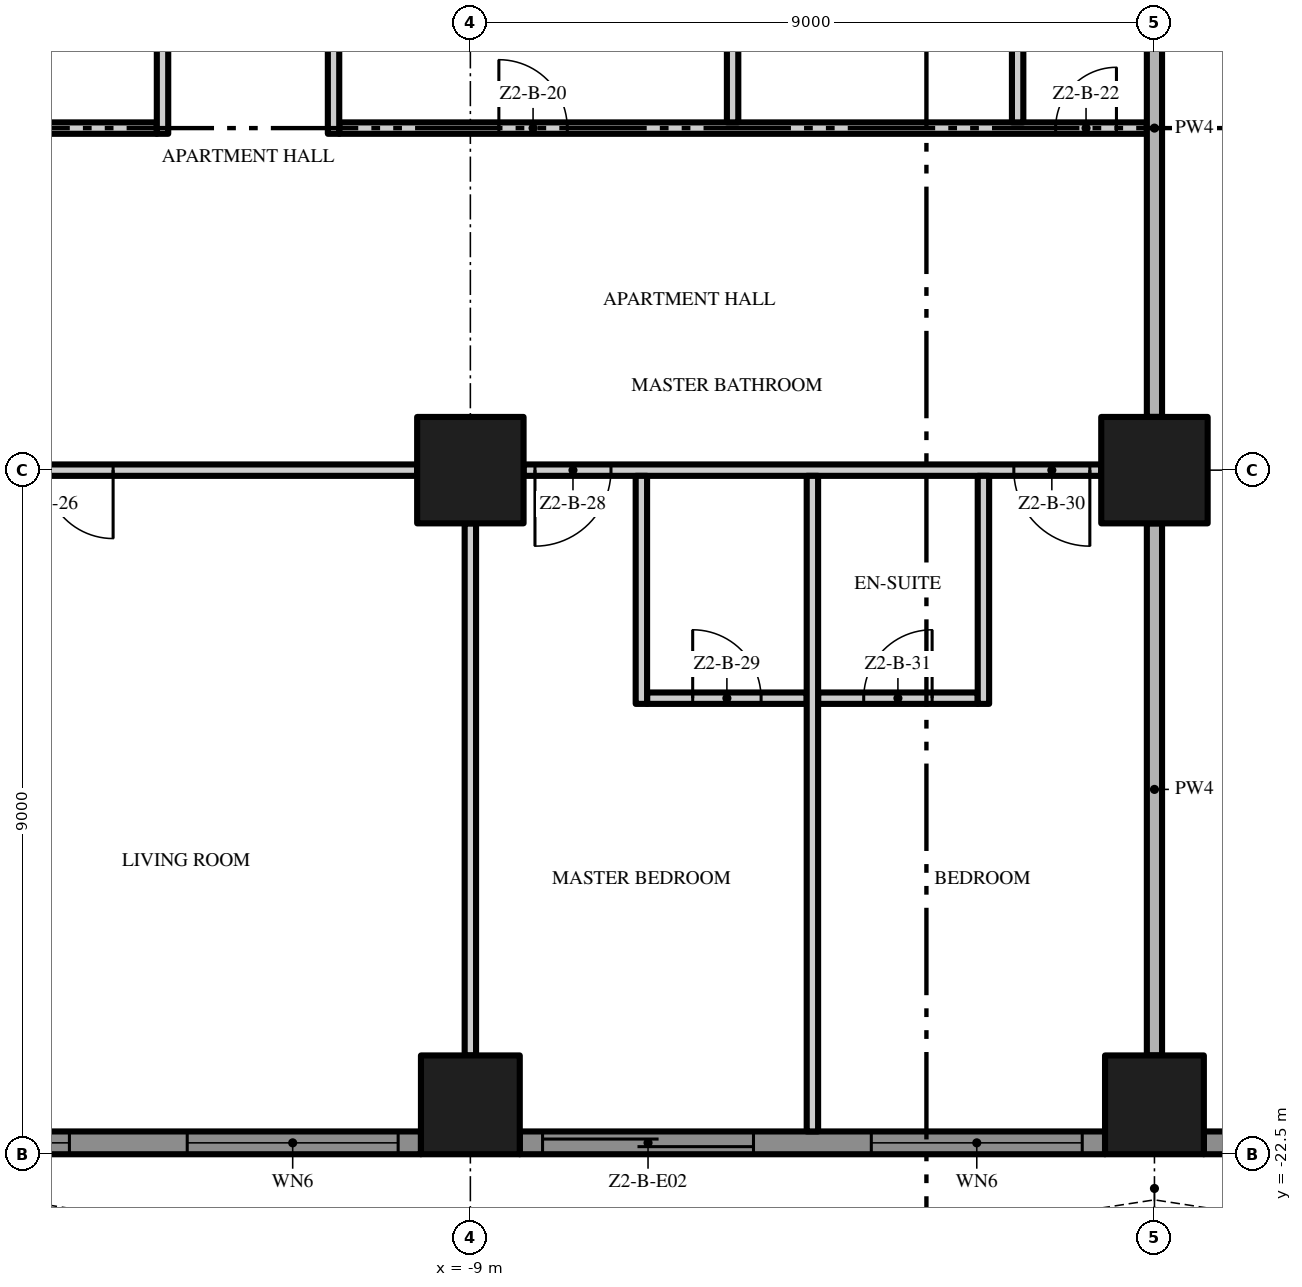
"""IFC4 building model, lengths in metres.
Left out: names, types, materials, properties, quantities, classifications, styles, units other than length and angle.
Written with IfcOpenShell. Run it as: python <this file> out.ifc"""

import sys

from ifc_helpers import new_model, si_unit, direction, frame, frame_2d, origin, origin_2d, place, context, subcontext, project, spatial, polyline, rectangle, outline, extrude, element, fill, save


model = new_model("IFC4")
c1 = context("Model", 3, precision=1e-05, world=origin(), true_north=direction((0.0, 1.0)))
c2 = subcontext(c1, "Body", "Model", "MODEL_VIEW")
j1 = project(units=[si_unit("LENGTHUNIT", "METRE"), si_unit("PLANEANGLEUNIT", "RADIAN")], contexts=[c1])
p1 = place(None, origin())
s1 = spatial("IfcSite", under=j1, at=p1, CompositionType="ELEMENT")
p2 = place(p1, origin())
s2 = spatial("IfcBuilding", under=s1, at=p2, CompositionType="ELEMENT")
p3 = place(p2, frame((0.0, 0.0, 84.6)))
s3 = spatial("IfcBuildingStorey", under=s2, at=p3, CompositionType="ELEMENT", Elevation=84.6)
p4 = place(p3, frame((-9.0, -13.5, 0.0), z_axis=(0.0, 0.0, 1.0), x_axis=(1.0, 0.0, 0.0)))
e1 = element("IfcColumn", 1, at=p4, inside=s3, PredefinedType="COLUMN", context=c2, shape_type="SweptSolid", body=[
    extrude(rectangle(XDim=1.4, YDim=1.4, at=origin_2d()), origin(), (0.0, 0.0, 1.0), 3.5),
])
p5 = place(p3, frame((-9.0, -21.85, 0.0), z_axis=(0.0, 0.0, 1.0), x_axis=(1.0, 0.0, 0.0)))
e2 = element("IfcColumn", 2, at=p5, inside=s3, PredefinedType="COLUMN", context=c2, shape_type="SweptSolid", body=[
    extrude(rectangle(XDim=1.3, YDim=1.3, at=origin_2d()), origin(), (0.0, 0.0, 1.0), 3.5),
])
p6 = place(p3, frame((0.0, -13.5, 0.0), z_axis=(0.0, 0.0, 1.0), x_axis=(1.0, 0.0, 0.0)))
e3 = element("IfcColumn", 3, at=p6, inside=s3, PredefinedType="COLUMN", context=c2, shape_type="SweptSolid", body=[
    extrude(rectangle(XDim=1.4, YDim=1.4, at=origin_2d()), origin(), (0.0, 0.0, 1.0), 3.5),
])
p7 = place(p3, frame((0.0, -21.85, 0.0), z_axis=(0.0, 0.0, 1.0), x_axis=(1.0, 0.0, 0.0)))
e4 = element("IfcColumn", 4, at=p7, inside=s3, PredefinedType="COLUMN", context=c2, shape_type="SweptSolid", body=[
    extrude(rectangle(XDim=1.3, YDim=1.3, at=origin_2d()), origin(), (0.0, 0.0, 1.0), 3.5),
])
p8 = place(p3, frame((-9.65, -22.35, 0.0), z_axis=(0.0, 0.0, 1.0), x_axis=(-1.0, 0.0, 0.0)))
e5 = element("IfcWall", 5, at=p8, inside=s3, PredefinedType="SOLIDWALL", context=c2, shape_type="SweptSolid", body=[
    extrude(rectangle(XDim=7.7, YDim=0.3, at=frame_2d((3.85, 0.0))), origin(), (0.0, 0.0, 1.0), 3.5),
])
p9 = place(p8, frame((4.625, 0.0, 0.45)))
e6 = element("IfcOpeningElement", 6, at=p9, cuts=e5, PredefinedType="OPENING", context=c2, shape_type="SweptSolid", body=[
    extrude(rectangle(XDim=2.775, YDim=2.65, at=frame_2d((1.387, 1.325))), frame((0.0, 0.16, 0.0), z_axis=(0.0, -1.0, 0.0), x_axis=(1.0, 0.0, 0.0)), (0.0, 0.0, 1.0), 0.32),
])
p10 = place(p8, frame((0.3, 0.0, 0.45)))
e7 = element("IfcOpeningElement", 7, at=p10, cuts=e5, PredefinedType="OPENING", context=c2, shape_type="SweptSolid", body=[
    extrude(rectangle(XDim=2.775, YDim=2.65, at=frame_2d((1.387, 1.325))), frame((0.0, 0.16, 0.0), z_axis=(0.0, -1.0, 0.0), x_axis=(1.0, 0.0, 0.0)), (0.0, 0.0, 1.0), 0.32),
])
p11 = place(p3, frame((-0.65, -22.35, 0.0), z_axis=(0.0, 0.0, 1.0), x_axis=(-1.0, 0.0, 0.0)))
e8 = element("IfcWall", 8, at=p11, inside=s3, PredefinedType="SOLIDWALL", context=c2, shape_type="SweptSolid", body=[
    extrude(rectangle(XDim=7.7, YDim=0.3, at=frame_2d((3.85, 0.0))), origin(), (0.0, 0.0, 1.0), 3.5),
])
p12 = place(p11, frame((4.625, 0.0, 0.0)))
e9 = element("IfcOpeningElement", 9, at=p12, cuts=e8, PredefinedType="OPENING", context=c2, shape_type="SweptSolid", body=[
    extrude(rectangle(XDim=2.775, YDim=2.4, at=frame_2d((1.387, 1.2))), frame((0.0, 0.16, 0.0), z_axis=(0.0, -1.0, 0.0), x_axis=(1.0, 0.0, 0.0)), (0.0, 0.0, 1.0), 0.32),
])
p13 = place(p11, frame((0.3, 0.0, 0.45)))
e10 = element("IfcOpeningElement", 10, at=p13, cuts=e8, PredefinedType="OPENING", context=c2, shape_type="SweptSolid", body=[
    extrude(rectangle(XDim=2.775, YDim=2.65, at=frame_2d((1.387, 1.325))), frame((0.0, 0.16, 0.0), z_axis=(0.0, -1.0, 0.0), x_axis=(1.0, 0.0, 0.0)), (0.0, 0.0, 1.0), 0.32),
])
p14 = place(p3, frame((8.35, -22.35, 0.0), z_axis=(0.0, 0.0, 1.0), x_axis=(-1.0, 0.0, 0.0)))
e11 = element("IfcWall", 11, at=p14, inside=s3, PredefinedType="SOLIDWALL", context=c2, shape_type="SweptSolid", body=[
    extrude(rectangle(XDim=7.7, YDim=0.3, at=frame_2d((3.85, 0.0))), origin(), (0.0, 0.0, 1.0), 3.5),
])
p15 = place(p14, frame((4.625, 0.0, 0.45)))
e12 = element("IfcOpeningElement", 12, at=p15, cuts=e11, PredefinedType="OPENING", context=c2, shape_type="SweptSolid", body=[
    extrude(rectangle(XDim=2.775, YDim=2.65, at=frame_2d((1.387, 1.325))), frame((0.0, 0.16, 0.0), z_axis=(0.0, -1.0, 0.0), x_axis=(1.0, 0.0, 0.0)), (0.0, 0.0, 1.0), 0.32),
])
p16 = place(p14, frame((0.3, 0.0, 0.0)))
e13 = element("IfcOpeningElement", 13, at=p16, cuts=e11, PredefinedType="OPENING", context=c2, shape_type="SweptSolid", body=[
    extrude(rectangle(XDim=2.775, YDim=2.4, at=frame_2d((1.387, 1.2))), frame((0.0, 0.16, 0.0), z_axis=(0.0, -1.0, 0.0), x_axis=(1.0, 0.0, 0.0)), (0.0, 0.0, 1.0), 0.32),
])
p17 = place(p3, origin())
e14 = element("IfcWall", 14, at=p17, inside=s3, PredefinedType="USERDEFINED", context=c2, shape_type="SweptSolid", body=[
    extrude(outline(polyline([(-22.5, -25.5), (-21.0, -25.271), (-19.5, -24.671), (-18.0, -23.929), (-16.5, -23.329), (-15.0, -23.1), (-13.5, -23.329), (-12.0, -23.929), (-10.5, -24.671), (-9.0, -25.271), (-7.5, -25.5), (-6.0, -25.271), (-4.5, -24.671), (-3.0, -23.929), (-1.5, -23.329), (0.0, -23.1), (1.5, -23.329), (3.0, -23.929), (4.5, -24.671), (6.0, -25.271), (7.5, -25.5), (9.0, -25.271), (10.5, -24.671), (12.0, -23.929), (13.5, -23.329), (15.0, -23.1), (16.5, -23.329), (18.0, -23.929), (19.5, -24.671), (21.0, -25.271), (22.5, -25.5), (22.538, -25.253), (21.066, -25.028), (19.602, -24.442), (18.102, -23.701), (16.566, -23.086), (15.0, -22.847), (13.434, -23.086), (11.898, -23.701), (10.398, -24.442), (8.934, -25.028), (7.5, -25.247), (6.066, -25.028), (4.602, -24.442), (3.102, -23.701), (1.566, -23.086), (0.0, -22.847), (-1.566, -23.086), (-3.102, -23.701), (-4.602, -24.442), (-6.066, -25.028), (-7.5, -25.247), (-8.934, -25.028), (-10.398, -24.442), (-11.898, -23.701), (-13.434, -23.086), (-15.0, -22.847), (-16.566, -23.086), (-18.102, -23.701), (-19.602, -24.442), (-21.066, -25.028), (-22.538, -25.253), (-22.5, -25.5)])), origin(), (0.0, 0.0, 1.0), 0.9),
])
p18 = place(p3, frame((-6.675, -16.5, 0.0), z_axis=(0.0, 0.0, 1.0), x_axis=(1.0, 0.0, 0.0)))
e15 = element("IfcWall", 15, at=p18, inside=s3, PredefinedType="PARTITIONING", context=c2, shape_type="SweptSolid", body=[
    extrude(rectangle(XDim=2.1, YDim=0.15, at=frame_2d((1.05, 0.0))), origin(), (0.0, 0.0, 1.0), 3.5),
])
p19 = place(p18, frame((0.6, 0.0, 0.0)))
e16 = element("IfcOpeningElement", 16, at=p19, cuts=e15, PredefinedType="OPENING", context=c2, shape_type="SweptSolid", body=[
    extrude(rectangle(XDim=0.9, YDim=2.1, at=frame_2d((0.45, 1.05))), frame((0.0, 0.085, 0.0), z_axis=(0.0, -1.0, 0.0), x_axis=(1.0, 0.0, 0.0)), (0.0, 0.0, 1.0), 0.17),
])
p20 = place(p3, frame((-4.425, -16.5, 0.0), z_axis=(0.0, 0.0, 1.0), x_axis=(1.0, 0.0, 0.0)))
e17 = element("IfcWall", 17, at=p20, inside=s3, PredefinedType="PARTITIONING", context=c2, shape_type="SweptSolid", body=[
    extrude(rectangle(XDim=2.1, YDim=0.15, at=frame_2d((1.05, 0.0))), origin(), (0.0, 0.0, 1.0), 3.5),
])
p21 = place(p20, frame((0.6, 0.0, 0.0)))
e18 = element("IfcOpeningElement", 18, at=p21, cuts=e17, PredefinedType="OPENING", context=c2, shape_type="SweptSolid", body=[
    extrude(rectangle(XDim=0.9, YDim=2.1, at=frame_2d((0.45, 1.05))), frame((0.0, 0.085, 0.0), z_axis=(0.0, -1.0, 0.0), x_axis=(1.0, 0.0, 0.0)), (0.0, 0.0, 1.0), 0.17),
])
p22 = place(p3, frame((-9.7, -13.5, 0.0), z_axis=(0.0, 0.0, 1.0), x_axis=(-1.0, 0.0, 0.0)))
e19 = element("IfcWall", 19, at=p22, inside=s3, PredefinedType="PARTITIONING", context=c2, shape_type="SweptSolid", body=[
    extrude(rectangle(XDim=7.6, YDim=0.15, at=frame_2d((3.8, 0.0))), origin(), (0.0, 0.0, 1.0), 3.5),
])
p23 = place(p22, frame((4.0, 0.0, 0.0)))
e20 = element("IfcOpeningElement", 20, at=p23, cuts=e19, PredefinedType="OPENING", context=c2, shape_type="SweptSolid", body=[
    extrude(rectangle(XDim=1.8, YDim=2.4, at=frame_2d((0.9, 1.2))), frame((0.0, 0.085, 0.0), z_axis=(0.0, -1.0, 0.0), x_axis=(1.0, 0.0, 0.0)), (0.0, 0.0, 1.0), 0.17),
])
p24 = place(p3, frame((-0.7, -13.5, 0.0), z_axis=(0.0, 0.0, 1.0), x_axis=(-1.0, 0.0, 0.0)))
e21 = element("IfcWall", 21, at=p24, inside=s3, PredefinedType="PARTITIONING", context=c2, shape_type="SweptSolid", body=[
    extrude(rectangle(XDim=7.6, YDim=0.15, at=frame_2d((3.8, 0.0))), origin(), (0.0, 0.0, 1.0), 3.5),
])
p25 = place(p24, frame((6.45, 0.0, 0.0)))
e22 = element("IfcOpeningElement", 22, at=p25, cuts=e21, PredefinedType="OPENING", context=c2, shape_type="SweptSolid", body=[
    extrude(rectangle(XDim=1.0, YDim=2.4, at=frame_2d((0.5, 1.2))), frame((0.0, 0.085, 0.0), z_axis=(0.0, -1.0, 0.0), x_axis=(1.0, 0.0, 0.0)), (0.0, 0.0, 1.0), 0.17),
])
p26 = place(p24, frame((0.15, 0.0, 0.0)))
e23 = element("IfcOpeningElement", 23, at=p26, cuts=e21, PredefinedType="OPENING", context=c2, shape_type="SweptSolid", body=[
    extrude(rectangle(XDim=1.0, YDim=2.4, at=frame_2d((0.5, 1.2))), frame((0.0, 0.085, 0.0), z_axis=(0.0, -1.0, 0.0), x_axis=(1.0, 0.0, 0.0)), (0.0, 0.0, 1.0), 0.17),
])
p27 = place(p3, frame((-26.7, -9.0, 0.0), z_axis=(0.0, 0.0, 1.0), x_axis=(1.0, 0.0, 0.0)))
e24 = element("IfcWall", 24, at=p27, inside=s3, PredefinedType="PARTITIONING", context=c2, shape_type="SweptSolid", body=[
    extrude(rectangle(XDim=13.575, YDim=0.15, at=frame_2d((6.787, 0.0))), origin(), (0.0, 0.0, 1.0), 3.5),
])
p28 = place(p3, frame((-10.725, -9.0, 0.0), z_axis=(0.0, 0.0, 1.0), x_axis=(1.0, 0.0, 0.0)))
e25 = element("IfcWall", 25, at=p28, inside=s3, PredefinedType="PARTITIONING", context=c2, shape_type="SweptSolid", body=[
    extrude(rectangle(XDim=10.625, YDim=0.15, at=frame_2d((5.312, 0.0))), origin(), (0.0, 0.0, 1.0), 3.5),
])
p29 = place(p28, frame((2.1, 0.0, 0.0)))
e26 = element("IfcOpeningElement", 26, at=p29, cuts=e25, PredefinedType="OPENING", context=c2, shape_type="SweptSolid", body=[
    extrude(rectangle(XDim=0.9, YDim=2.1, at=frame_2d((0.45, 1.05))), frame((0.0, 0.085, 0.0), z_axis=(0.0, -1.0, 0.0), x_axis=(1.0, 0.0, 0.0)), (0.0, 0.0, 1.0), 0.17),
])
p30 = place(p28, frame((9.425, 0.0, 0.0)))
e27 = element("IfcOpeningElement", 27, at=p30, cuts=e25, PredefinedType="OPENING", context=c2, shape_type="SweptSolid", body=[
    extrude(rectangle(XDim=0.8, YDim=2.0, at=frame_2d((0.4, 1.0))), frame((0.0, 0.085, 0.0), z_axis=(0.0, -1.0, 0.0), x_axis=(1.0, 0.0, 0.0)), (0.0, 0.0, 1.0), 0.17),
])
p31 = place(p3, frame((-13.05, -9.075, 0.0), z_axis=(0.0, 0.0, 1.0), x_axis=(0.0, 1.0, 0.0)))
e28 = element("IfcWall", 28, at=p31, inside=s3, PredefinedType="PARTITIONING", context=c2, shape_type="SweptSolid", body=[
    extrude(rectangle(XDim=4.65, YDim=0.15, at=frame_2d((2.325, 0.0))), origin(), (0.0, 0.0, 1.0), 3.5),
])
p32 = place(p31, frame((1.875, 0.0, 0.0)))
e29 = element("IfcOpeningElement", 29, at=p32, cuts=e28, PredefinedType="OPENING", context=c2, shape_type="SweptSolid", body=[
    extrude(rectangle(XDim=0.9, YDim=2.1, at=frame_2d((0.45, 1.05))), frame((0.0, 0.085, 0.0), z_axis=(0.0, -1.0, 0.0), x_axis=(1.0, 0.0, 0.0)), (0.0, 0.0, 1.0), 0.17),
])
p33 = place(p3, frame((-10.8, -9.075, 0.0), z_axis=(0.0, 0.0, 1.0), x_axis=(0.0, 1.0, 0.0)))
e30 = element("IfcWall", 30, at=p33, inside=s3, PredefinedType="PARTITIONING", context=c2, shape_type="SweptSolid", body=[
    extrude(rectangle(XDim=4.5, YDim=0.15, at=frame_2d((2.25, 0.0))), origin(), (0.0, 0.0, 1.0), 3.5),
])
p34 = place(p3, frame((-9.0, -21.2, 0.0), z_axis=(0.0, 0.0, 1.0), x_axis=(0.0, 1.0, 0.0)))
e31 = element("IfcWall", 31, at=p34, inside=s3, PredefinedType="PARTITIONING", context=c2, shape_type="SweptSolid", body=[
    extrude(rectangle(XDim=7.0, YDim=0.15, at=frame_2d((3.5, 0.0))), origin(), (0.0, 0.0, 1.0), 3.5),
])
p35 = place(p3, frame((-6.75, -16.575, 0.0), z_axis=(0.0, 0.0, 1.0), x_axis=(0.0, 1.0, 0.0)))
e32 = element("IfcWall", 32, at=p35, inside=s3, PredefinedType="PARTITIONING", context=c2, shape_type="SweptSolid", body=[
    extrude(rectangle(XDim=3.0, YDim=0.15, at=frame_2d((1.5, 0.0))), origin(), (0.0, 0.0, 1.0), 3.5),
])
p36 = place(p3, frame((-5.55, -4.575, 0.0), z_axis=(0.0, 0.0, 1.0), x_axis=(0.0, -1.0, 0.0)))
e33 = element("IfcWall", 33, at=p36, inside=s3, PredefinedType="PARTITIONING", context=c2, shape_type="SweptSolid", body=[
    extrude(rectangle(XDim=4.35, YDim=0.15, at=frame_2d((2.175, 0.0))), origin(), (0.0, 0.0, 1.0), 3.5),
])
p37 = place(p36, frame((1.7, 0.0, 0.0)))
e34 = element("IfcOpeningElement", 34, at=p37, cuts=e33, PredefinedType="OPENING", context=c2, shape_type="SweptSolid", body=[
    extrude(rectangle(XDim=0.9, YDim=2.1, at=frame_2d((0.45, 1.05))), frame((0.0, 0.085, 0.0), z_axis=(0.0, -1.0, 0.0), x_axis=(1.0, 0.0, 0.0)), (0.0, 0.0, 1.0), 0.17),
])
p38 = place(p3, frame((-4.5, -22.2, 0.0), z_axis=(0.0, 0.0, 1.0), x_axis=(0.0, 1.0, 0.0)))
e35 = element("IfcWall", 35, at=p38, inside=s3, PredefinedType="PARTITIONING", context=c2, shape_type="SweptSolid", body=[
    extrude(rectangle(XDim=8.625, YDim=0.15, at=frame_2d((4.312, 0.0))), origin(), (0.0, 0.0, 1.0), 3.5),
])
p39 = place(p3, frame((-2.25, -16.575, 0.0), z_axis=(0.0, 0.0, 1.0), x_axis=(0.0, 1.0, 0.0)))
e36 = element("IfcWall", 36, at=p39, inside=s3, PredefinedType="PARTITIONING", context=c2, shape_type="SweptSolid", body=[
    extrude(rectangle(XDim=3.0, YDim=0.15, at=frame_2d((1.5, 0.0))), origin(), (0.0, 0.0, 1.0), 3.5),
])
p40 = place(p3, frame((-1.8, -8.925, 0.0), z_axis=(0.0, 0.0, 1.0), x_axis=(0.0, 1.0, 0.0)))
e37 = element("IfcWall", 37, at=p40, inside=s3, PredefinedType="PARTITIONING", context=c2, shape_type="SweptSolid", body=[
    extrude(rectangle(XDim=4.35, YDim=0.15, at=frame_2d((2.175, 0.0))), origin(), (0.0, 0.0, 1.0), 3.5),
])
p41 = place(p3, frame((0.0, -21.2, 0.0), z_axis=(0.0, 0.0, 1.0), x_axis=(0.0, 1.0, 0.0)))
e38 = element("IfcWall", 38, at=p41, inside=s3, PredefinedType="PARTITIONING", context=c2, shape_type="SweptSolid", body=[
    extrude(rectangle(XDim=7.0, YDim=0.2, at=frame_2d((3.5, 0.0))), origin(), (0.0, 0.0, 1.0), 3.5),
])
p42 = place(p3, frame((0.0, -12.8, 0.0), z_axis=(0.0, 0.0, 1.0), x_axis=(0.0, 1.0, 0.0)))
e39 = element("IfcWall", 39, at=p42, inside=s3, PredefinedType="PARTITIONING", context=c2, shape_type="SweptSolid", body=[
    extrude(rectangle(XDim=7.6, YDim=0.2, at=frame_2d((3.8, 0.0))), origin(), (0.0, 0.0, 1.0), 3.5),
])
p43 = place(p9, origin())
e40 = element("IfcWindow", 40, at=p43, inside=s3, PartitioningType="SINGLE_PANEL", PredefinedType="WINDOW", context=c2, shape_type="SweptSolid", body=[
    extrude(rectangle(XDim=2.775, YDim=2.65, at=frame_2d((1.387, 1.325))), frame((0.0, 0.03, 0.0), z_axis=(0.0, -1.0, 0.0), x_axis=(1.0, 0.0, 0.0)), (0.0, 0.0, 1.0), 0.06),
])
fill(e6, e40)
p44 = place(p10, origin())
e41 = element("IfcWindow", 41, at=p44, inside=s3, PartitioningType="SINGLE_PANEL", PredefinedType="WINDOW", context=c2, shape_type="SweptSolid", body=[
    extrude(rectangle(XDim=2.775, YDim=2.65, at=frame_2d((1.387, 1.325))), frame((0.0, 0.03, 0.0), z_axis=(0.0, -1.0, 0.0), x_axis=(1.0, 0.0, 0.0)), (0.0, 0.0, 1.0), 0.06),
])
fill(e7, e41)
p45 = place(p12, origin())
e42 = element("IfcDoor", 42, at=p45, inside=s3, OperationType="SINGLE_SWING_LEFT", PredefinedType="DOOR", context=c2, shape_type="SweptSolid", body=[
    extrude(rectangle(XDim=2.775, YDim=2.4, at=frame_2d((1.387, 1.2))), frame((0.0, 0.025, 0.0), z_axis=(0.0, -1.0, 0.0), x_axis=(1.0, 0.0, 0.0)), (0.0, 0.0, 1.0), 0.05),
])
fill(e9, e42)
p46 = place(p13, origin())
e43 = element("IfcWindow", 43, at=p46, inside=s3, PartitioningType="SINGLE_PANEL", PredefinedType="WINDOW", context=c2, shape_type="SweptSolid", body=[
    extrude(rectangle(XDim=2.775, YDim=2.65, at=frame_2d((1.387, 1.325))), frame((0.0, 0.03, 0.0), z_axis=(0.0, -1.0, 0.0), x_axis=(1.0, 0.0, 0.0)), (0.0, 0.0, 1.0), 0.06),
])
fill(e10, e43)
p47 = place(p29, origin())
e44 = element("IfcDoor", 44, at=p47, inside=s3, OperationType="SINGLE_SWING_LEFT", PredefinedType="DOOR", context=c2, shape_type="SweptSolid", body=[
    extrude(rectangle(XDim=0.9, YDim=2.1, at=frame_2d((0.45, 1.05))), frame((0.0, 0.025, 0.0), z_axis=(0.0, -1.0, 0.0), x_axis=(1.0, 0.0, 0.0)), (0.0, 0.0, 1.0), 0.05),
])
fill(e26, e44)
p48 = place(p30, origin())
e45 = element("IfcDoor", 45, at=p48, inside=s3, OperationType="SINGLE_SWING_RIGHT", PredefinedType="DOOR", context=c2, shape_type="SweptSolid", body=[
    extrude(rectangle(XDim=0.8, YDim=2.0, at=frame_2d((0.4, 1.0))), frame((0.0, 0.025, 0.0), z_axis=(0.0, -1.0, 0.0), x_axis=(1.0, 0.0, 0.0)), (0.0, 0.0, 1.0), 0.05),
])
fill(e27, e45)
p49 = place(p23, origin())
e46 = element("IfcDoor", 46, at=p49, inside=s3, OperationType="DOUBLE_DOOR_SINGLE_SWING", PredefinedType="DOOR", context=c2, shape_type="SweptSolid", body=[
    extrude(rectangle(XDim=1.8, YDim=2.4, at=frame_2d((0.9, 1.2))), frame((0.0, 0.025, 0.0), z_axis=(0.0, -1.0, 0.0), x_axis=(1.0, 0.0, 0.0)), (0.0, 0.0, 1.0), 0.05),
])
fill(e20, e46)
p50 = place(p25, origin())
e47 = element("IfcDoor", 47, at=p50, inside=s3, OperationType="SINGLE_SWING_RIGHT", PredefinedType="DOOR", context=c2, shape_type="SweptSolid", body=[
    extrude(rectangle(XDim=1.0, YDim=2.4, at=frame_2d((0.5, 1.2))), frame((0.0, 0.025, 0.0), z_axis=(0.0, -1.0, 0.0), x_axis=(1.0, 0.0, 0.0)), (0.0, 0.0, 1.0), 0.05),
])
fill(e22, e47)
p51 = place(p19, origin())
e48 = element("IfcDoor", 48, at=p51, inside=s3, OperationType="SINGLE_SWING_LEFT", PredefinedType="DOOR", context=c2, shape_type="SweptSolid", body=[
    extrude(rectangle(XDim=0.9, YDim=2.1, at=frame_2d((0.45, 1.05))), frame((0.0, 0.025, 0.0), z_axis=(0.0, -1.0, 0.0), x_axis=(1.0, 0.0, 0.0)), (0.0, 0.0, 1.0), 0.05),
])
fill(e16, e48)
p52 = place(p26, origin())
e49 = element("IfcDoor", 49, at=p52, inside=s3, OperationType="SINGLE_SWING_LEFT", PredefinedType="DOOR", context=c2, shape_type="SweptSolid", body=[
    extrude(rectangle(XDim=1.0, YDim=2.4, at=frame_2d((0.5, 1.2))), frame((0.0, 0.025, 0.0), z_axis=(0.0, -1.0, 0.0), x_axis=(1.0, 0.0, 0.0)), (0.0, 0.0, 1.0), 0.05),
])
fill(e23, e49)
p53 = place(p21, origin())
e50 = element("IfcDoor", 50, at=p53, inside=s3, OperationType="SINGLE_SWING_RIGHT", PredefinedType="DOOR", context=c2, shape_type="SweptSolid", body=[
    extrude(rectangle(XDim=0.9, YDim=2.1, at=frame_2d((0.45, 1.05))), frame((0.0, 0.025, 0.0), z_axis=(0.0, -1.0, 0.0), x_axis=(1.0, 0.0, 0.0)), (0.0, 0.0, 1.0), 0.05),
])
fill(e18, e50)
save(model, sys.argv[1])
